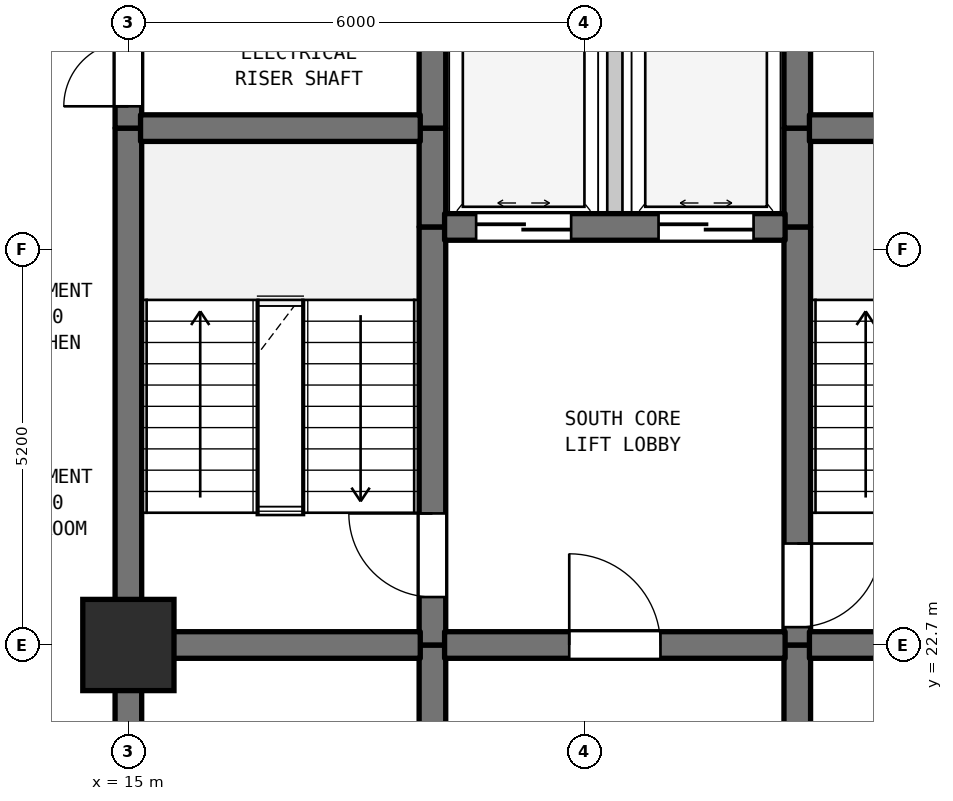
"""IFC4 building model, lengths in metres.
Left out: names, types, materials, properties, quantities, classifications, styles, units other than length and angle.
Written with IfcOpenShell. Run it as: python <this file> out.ifc"""

import sys

from ifc_helpers import new_model, si_unit, direction, frame, frame_2d, origin, origin_2d, place, context, subcontext, project, spatial, rectangle, extrude, element, fill, save


model = new_model("IFC4")
c1 = context("Model", 3, precision=1e-05, world=origin(), true_north=direction((0.0, 1.0)))
c2 = subcontext(c1, "Body", "Model", "MODEL_VIEW")
j1 = project(units=[si_unit("LENGTHUNIT", "METRE"), si_unit("PLANEANGLEUNIT", "RADIAN")], contexts=[c1])
p1 = place(None, origin())
s1 = spatial("IfcSite", under=j1, at=p1, CompositionType="ELEMENT")
p2 = place(p1, origin())
s2 = spatial("IfcBuilding", under=s1, at=p2, CompositionType="ELEMENT")
p3 = place(p2, frame((0.0, 0.0, 70.1)))
s3 = spatial("IfcBuildingStorey", under=s2, at=p3, CompositionType="ELEMENT", Elevation=70.1)
p4 = place(p3, frame((15.0, 22.7, 0.0), z_axis=(0.0, 0.0, 1.0), x_axis=(1.0, 0.0, 0.0)))
e1 = element("IfcColumn", 1, at=p4, inside=s3, PredefinedType="COLUMN", context=c2, shape_type="SweptSolid", body=[
    extrude(rectangle(XDim=1.2, YDim=1.2, at=origin_2d()), origin(), (0.0, 0.0, 1.0), 3.7),
])
p5 = place(p3, frame((15.0, 19.5, 0.0), z_axis=(0.0, 0.0, 1.0), x_axis=(0.0, 1.0, 0.0)))
e2 = element("IfcWall", 2, at=p5, inside=s3, PredefinedType="SHEAR", context=c2, shape_type="SweptSolid", body=[
    extrude(rectangle(XDim=3.2, YDim=0.35, at=frame_2d((1.6, 0.0))), origin(), (0.0, 0.0, 1.0), 3.385),
])
p6 = place(p3, frame((15.0, 22.7, 0.0), z_axis=(0.0, 0.0, 1.0), x_axis=(0.0, 1.0, 0.0)))
e3 = element("IfcWall", 3, at=p6, inside=s3, PredefinedType="SHEAR", context=c2, shape_type="SweptSolid", body=[
    extrude(rectangle(XDim=6.8, YDim=0.35, at=frame_2d((3.4, 0.0))), origin(), (0.0, 0.0, 1.0), 3.385),
])
p7 = place(p3, frame((15.0, 29.5, 0.0), z_axis=(0.0, 0.0, 1.0), x_axis=(0.0, 1.0, 0.0)))
e4 = element("IfcWall", 4, at=p7, inside=s3, PredefinedType="SHEAR", context=c2, shape_type="SweptSolid", body=[
    extrude(rectangle(XDim=1.6, YDim=0.35, at=frame_2d((0.8, 0.0))), origin(), (0.0, 0.0, 1.0), 3.385),
])
p8 = place(p7, frame((0.287, 0.0, 0.0)))
e5 = element("IfcOpeningElement", 5, at=p8, cuts=e4, PredefinedType="OPENING", context=c2, shape_type="SweptSolid", body=[
    extrude(rectangle(XDim=0.85, YDim=2.1, at=frame_2d((0.425, 1.05))), frame((0.0, 0.185, 0.0), z_axis=(0.0, -1.0, 0.0), x_axis=(1.0, 0.0, 0.0)), (0.0, 0.0, 1.0), 0.37),
])
p9 = place(p3, frame((19.0, 19.5, 0.0), z_axis=(0.0, 0.0, 1.0), x_axis=(0.0, 1.0, 0.0)))
e6 = element("IfcWall", 6, at=p9, inside=s3, PredefinedType="SHEAR", context=c2, shape_type="SweptSolid", body=[
    extrude(rectangle(XDim=3.2, YDim=0.35, at=frame_2d((1.6, 0.0))), origin(), (0.0, 0.0, 1.0), 3.385),
])
p10 = place(p3, frame((19.0, 22.7, 0.0), z_axis=(0.0, 0.0, 1.0), x_axis=(0.0, 1.0, 0.0)))
e7 = element("IfcWall", 7, at=p10, inside=s3, PredefinedType="SHEAR", context=c2, shape_type="SweptSolid", body=[
    extrude(rectangle(XDim=5.5, YDim=0.35, at=frame_2d((2.75, 0.0))), origin(), (0.0, 0.0, 1.0), 3.385),
])
p11 = place(p10, frame((0.631, 0.0, 0.0)))
e8 = element("IfcOpeningElement", 8, at=p11, cuts=e7, PredefinedType="OPENING", context=c2, shape_type="SweptSolid", body=[
    extrude(rectangle(XDim=1.1, YDim=2.15, at=frame_2d((0.55, 1.075))), frame((0.0, 0.185, 0.0), z_axis=(0.0, -1.0, 0.0), x_axis=(1.0, 0.0, 0.0)), (0.0, 0.0, 1.0), 0.37),
])
p12 = place(p3, frame((19.0, 28.2, 0.0), z_axis=(0.0, 0.0, 1.0), x_axis=(0.0, 1.0, 0.0)))
e9 = element("IfcWall", 9, at=p12, inside=s3, PredefinedType="SHEAR", context=c2, shape_type="SweptSolid", body=[
    extrude(rectangle(XDim=1.3, YDim=0.35, at=frame_2d((0.65, 0.0))), origin(), (0.0, 0.0, 1.0), 3.385),
])
p13 = place(p3, frame((19.0, 29.5, 0.0), z_axis=(0.0, 0.0, 1.0), x_axis=(0.0, 1.0, 0.0)))
e10 = element("IfcWall", 10, at=p13, inside=s3, PredefinedType="SHEAR", context=c2, shape_type="SweptSolid", body=[
    extrude(rectangle(XDim=5.5, YDim=0.35, at=frame_2d((2.75, 0.0))), origin(), (0.0, 0.0, 1.0), 3.385),
])
p14 = place(p13, frame((2.025, 0.0, 0.0)))
e11 = element("IfcOpeningElement", 11, at=p14, cuts=e10, PredefinedType="OPENING", context=c2, shape_type="SweptSolid", body=[
    extrude(rectangle(XDim=1.1, YDim=2.15, at=frame_2d((0.55, 1.075))), frame((0.0, 0.185, 0.0), z_axis=(0.0, -1.0, 0.0), x_axis=(1.0, 0.0, 0.0)), (0.0, 0.0, 1.0), 0.37),
])
p15 = place(p3, frame((21.4, 28.2, 0.0), z_axis=(0.0, 0.0, 1.0), x_axis=(0.0, 1.0, 0.0)))
e12 = element("IfcWall", 12, at=p15, inside=s3, PredefinedType="STANDARD", context=c2, shape_type="SweptSolid", body=[
    extrude(rectangle(XDim=2.6, YDim=0.2, at=frame_2d((1.3, 0.0))), origin(), (0.0, 0.0, 1.0), 3.385),
])
p16 = place(p3, frame((23.8, 19.5, 0.0), z_axis=(0.0, 0.0, 1.0), x_axis=(0.0, 1.0, 0.0)))
e13 = element("IfcWall", 13, at=p16, inside=s3, PredefinedType="SHEAR", context=c2, shape_type="SweptSolid", body=[
    extrude(rectangle(XDim=3.2, YDim=0.35, at=frame_2d((1.6, 0.0))), origin(), (0.0, 0.0, 1.0), 3.385),
])
p17 = place(p3, frame((23.8, 22.7, 0.0), z_axis=(0.0, 0.0, 1.0), x_axis=(0.0, 1.0, 0.0)))
e14 = element("IfcWall", 14, at=p17, inside=s3, PredefinedType="SHEAR", context=c2, shape_type="SweptSolid", body=[
    extrude(rectangle(XDim=5.5, YDim=0.35, at=frame_2d((2.75, 0.0))), origin(), (0.0, 0.0, 1.0), 3.385),
])
p18 = place(p17, frame((0.235, 0.0, 0.0)))
e15 = element("IfcOpeningElement", 15, at=p18, cuts=e14, PredefinedType="OPENING", context=c2, shape_type="SweptSolid", body=[
    extrude(rectangle(XDim=1.1, YDim=2.15, at=frame_2d((0.55, 1.075))), frame((0.0, 0.185, 0.0), z_axis=(0.0, -1.0, 0.0), x_axis=(1.0, 0.0, 0.0)), (0.0, 0.0, 1.0), 0.37),
])
for number, where, z_axis, x_axis in (
    (16, (23.8, 28.2, 0.0), (0.0, 0.0, 1.0), (0.0, 1.0, 0.0)),
    (17, (23.8, 29.5, 0.0), (0.0, 0.0, 1.0), (0.0, 1.0, 0.0)),
):
    element("IfcWall", number, at=place(p3, frame(where, z_axis=z_axis, x_axis=x_axis)), inside=s3, PredefinedType="SHEAR", context=c2, shape_type="SweptSolid", body=[
        extrude(rectangle(XDim=1.3, YDim=0.35, at=frame_2d((0.65, 0.0))), origin(), (0.0, 0.0, 1.0), 3.385),
    ])
p19 = place(p3, frame((15.16, 22.7, 0.0), z_axis=(0.0, 0.0, 1.0), x_axis=(1.0, 0.0, 0.0)))
e18 = element("IfcWall", 18, at=p19, inside=s3, PredefinedType="SHEAR", context=c2, shape_type="SweptSolid", body=[
    extrude(rectangle(XDim=3.68, YDim=0.35, at=frame_2d((1.84, 0.0))), origin(), (0.0, 0.0, 1.0), 3.385),
])
p20 = place(p3, frame((19.16, 22.7, 0.0), z_axis=(0.0, 0.0, 1.0), x_axis=(1.0, 0.0, 0.0)))
e19 = element("IfcWall", 19, at=p20, inside=s3, PredefinedType="SHEAR", context=c2, shape_type="SweptSolid", body=[
    extrude(rectangle(XDim=4.48, YDim=0.35, at=frame_2d((2.24, 0.0))), origin(), (0.0, 0.0, 1.0), 3.385),
])
p21 = place(p20, frame((1.64, 0.0, 0.0)))
e20 = element("IfcOpeningElement", 20, at=p21, cuts=e19, PredefinedType="OPENING", context=c2, shape_type="SweptSolid", body=[
    extrude(rectangle(XDim=1.2, YDim=2.2, at=frame_2d((0.6, 1.1))), frame((0.0, 0.185, 0.0), z_axis=(0.0, -1.0, 0.0), x_axis=(1.0, 0.0, 0.0)), (0.0, 0.0, 1.0), 0.37),
])
p22 = place(p3, frame((23.96, 22.7, 0.0), z_axis=(0.0, 0.0, 1.0), x_axis=(1.0, 0.0, 0.0)))
e21 = element("IfcWall", 21, at=p22, inside=s3, PredefinedType="SHEAR", context=c2, shape_type="SweptSolid", body=[
    extrude(rectangle(XDim=1.855, YDim=0.35, at=frame_2d((0.927, 0.0))), origin(), (0.0, 0.0, 1.0), 3.385),
])
p23 = place(p3, frame((19.16, 28.2, 0.0), z_axis=(0.0, 0.0, 1.0), x_axis=(1.0, 0.0, 0.0)))
e22 = element("IfcWall", 22, at=p23, inside=s3, PredefinedType="SHEAR", context=c2, shape_type="SweptSolid", body=[
    extrude(rectangle(XDim=4.48, YDim=0.35, at=frame_2d((2.24, 0.0))), origin(), (0.0, 0.0, 1.0), 3.385),
])
p24 = place(p23, frame((0.415, 0.0, 0.0)))
e23 = element("IfcOpeningElement", 23, at=p24, cuts=e22, PredefinedType="OPENING", context=c2, shape_type="SweptSolid", body=[
    extrude(rectangle(XDim=1.25, YDim=2.2, at=frame_2d((0.625, 1.1))), frame((0.0, 0.185, 0.0), z_axis=(0.0, -1.0, 0.0), x_axis=(1.0, 0.0, 0.0)), (0.0, 0.0, 1.0), 0.37),
])
p25 = place(p23, frame((2.815, 0.0, 0.0)))
e24 = element("IfcOpeningElement", 24, at=p25, cuts=e22, PredefinedType="OPENING", context=c2, shape_type="SweptSolid", body=[
    extrude(rectangle(XDim=1.25, YDim=2.2, at=frame_2d((0.625, 1.1))), frame((0.0, 0.185, 0.0), z_axis=(0.0, -1.0, 0.0), x_axis=(1.0, 0.0, 0.0)), (0.0, 0.0, 1.0), 0.37),
])
p26 = place(p3, frame((15.16, 29.5, 0.0), z_axis=(0.0, 0.0, 1.0), x_axis=(1.0, 0.0, 0.0)))
e25 = element("IfcWall", 25, at=p26, inside=s3, PredefinedType="SHEAR", context=c2, shape_type="SweptSolid", body=[
    extrude(rectangle(XDim=3.68, YDim=0.35, at=frame_2d((1.84, 0.0))), origin(), (0.0, 0.0, 1.0), 3.385),
])
p27 = place(p3, frame((23.96, 29.5, 0.0), z_axis=(0.0, 0.0, 1.0), x_axis=(1.0, 0.0, 0.0)))
e26 = element("IfcWall", 26, at=p27, inside=s3, PredefinedType="SHEAR", context=c2, shape_type="SweptSolid", body=[
    extrude(rectangle(XDim=3.18, YDim=0.35, at=frame_2d((1.59, 0.0))), origin(), (0.0, 0.0, 1.0), 3.385),
])
p28 = place(p8, origin())
e27 = element("IfcDoor", 27, at=p28, inside=s3, OperationType="SINGLE_SWING_LEFT", PredefinedType="DOOR", context=c2, shape_type="SweptSolid", body=[
    extrude(rectangle(XDim=0.85, YDim=2.1, at=frame_2d((0.425, 1.05))), frame((0.0, 0.025, 0.0), z_axis=(0.0, -1.0, 0.0), x_axis=(1.0, 0.0, 0.0)), (0.0, 0.0, 1.0), 0.05),
])
fill(e5, e27)
p29 = place(p11, origin())
e28 = element("IfcDoor", 28, at=p29, inside=s3, OperationType="SINGLE_SWING_RIGHT", PredefinedType="DOOR", context=c2, shape_type="SweptSolid", body=[
    extrude(rectangle(XDim=1.1, YDim=2.15, at=frame_2d((0.55, 1.075))), frame((0.0, 0.025, 0.0), z_axis=(0.0, -1.0, 0.0), x_axis=(1.0, 0.0, 0.0)), (0.0, 0.0, 1.0), 0.05),
])
fill(e8, e28)
p30 = place(p18, frame((1.1, 0.0, 0.0), z_axis=(0.0, 0.0, 1.0), x_axis=(-1.0, 0.0, 0.0)))
e29 = element("IfcDoor", 29, at=p30, inside=s3, OperationType="SINGLE_SWING_RIGHT", PredefinedType="DOOR", context=c2, shape_type="SweptSolid", body=[
    extrude(rectangle(XDim=1.1, YDim=2.15, at=frame_2d((0.55, 1.075))), frame((0.0, 0.025, 0.0), z_axis=(0.0, -1.0, 0.0), x_axis=(1.0, 0.0, 0.0)), (0.0, 0.0, 1.0), 0.05),
])
fill(e15, e29)
p31 = place(p21, origin())
e30 = element("IfcDoor", 30, at=p31, inside=s3, OperationType="SINGLE_SWING_LEFT", PredefinedType="DOOR", context=c2, shape_type="SweptSolid", body=[
    extrude(rectangle(XDim=1.2, YDim=2.2, at=frame_2d((0.6, 1.1))), frame((0.0, 0.025, 0.0), z_axis=(0.0, -1.0, 0.0), x_axis=(1.0, 0.0, 0.0)), (0.0, 0.0, 1.0), 0.05),
])
fill(e20, e30)
p32 = place(p24, origin())
e31 = element("IfcDoor", 31, at=p32, inside=s3, OperationType="DOUBLE_DOOR_SLIDING", PredefinedType="DOOR", context=c2, shape_type="SweptSolid", body=[
    extrude(rectangle(XDim=1.25, YDim=2.2, at=frame_2d((0.625, 1.1))), frame((0.0, 0.025, 0.0), z_axis=(0.0, -1.0, 0.0), x_axis=(1.0, 0.0, 0.0)), (0.0, 0.0, 1.0), 0.05),
])
fill(e23, e31)
p33 = place(p25, origin())
e32 = element("IfcDoor", 32, at=p33, inside=s3, OperationType="DOUBLE_DOOR_SLIDING", PredefinedType="DOOR", context=c2, shape_type="SweptSolid", body=[
    extrude(rectangle(XDim=1.25, YDim=2.2, at=frame_2d((0.625, 1.1))), frame((0.0, 0.025, 0.0), z_axis=(0.0, -1.0, 0.0), x_axis=(1.0, 0.0, 0.0)), (0.0, 0.0, 1.0), 0.05),
])
fill(e24, e32)
save(model, sys.argv[1])
